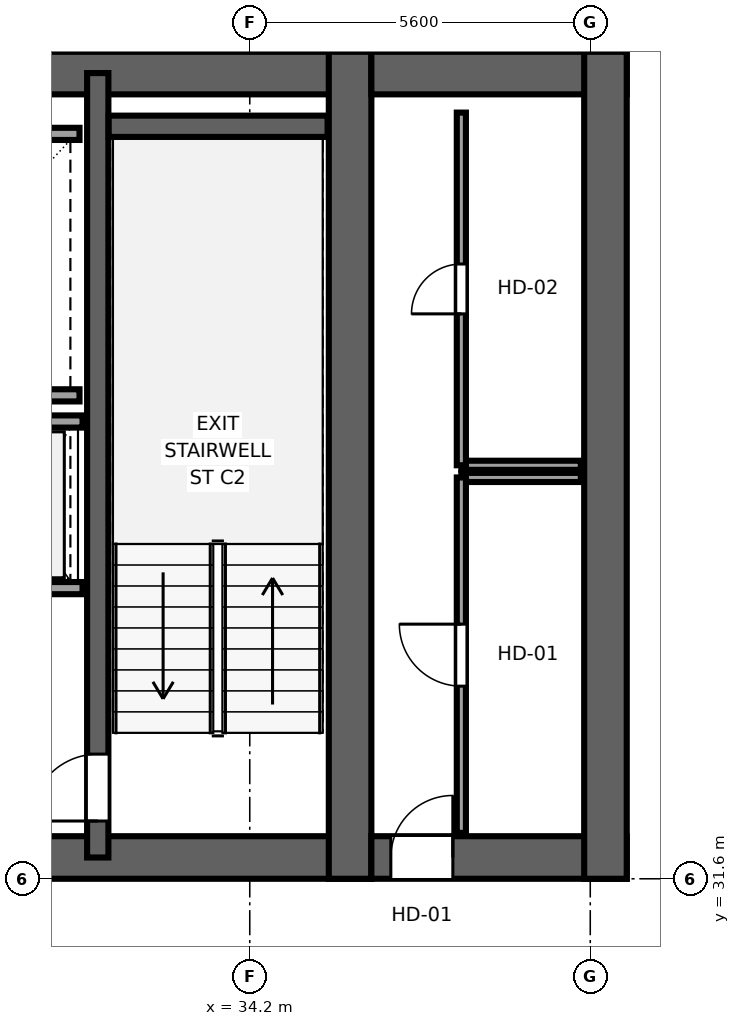
"""IFC4 building model, lengths in metres.
Left out: names, types, materials, properties, quantities, classifications, styles, units other than length and angle.
Written with IfcOpenShell. Run it as: python <this file> out.ifc"""

import sys

from ifc_helpers import new_model, si_unit, direction, frame, frame_2d, origin, place, context, subcontext, project, spatial, rectangle, extrude, source, transform, mapped, element, fill, save


model = new_model("IFC4")
c1 = context("Model", 3, precision=1e-05, world=origin(), true_north=direction((0.0, 1.0)))
c2 = subcontext(c1, "Body", "Model", "MODEL_VIEW")
j1 = project(units=[si_unit("LENGTHUNIT", "METRE"), si_unit("PLANEANGLEUNIT", "RADIAN")], contexts=[c1])
p1 = place(None, origin())
s1 = spatial("IfcSite", under=j1, at=p1, CompositionType="ELEMENT")
p2 = place(p1, origin())
s2 = spatial("IfcBuilding", under=s1, at=p2, CompositionType="ELEMENT")
p3 = place(p2, frame((0.0, 0.0, 150.6)))
s3 = spatial("IfcBuildingStorey", under=s2, at=p3, CompositionType="ELEMENT", Elevation=150.6)
p4 = place(p3, frame((9.8, 31.95, 0.0), z_axis=(0.0, 0.0, 1.0), x_axis=(1.0, 0.0, 0.0)))
e1 = element("IfcWall", 1, at=p4, inside=s3, PredefinedType="SHEAR", context=c2, shape_type="SweptSolid", body=[
    extrude(rectangle(XDim=26.4, YDim=0.7, at=frame_2d((13.2, 0.0))), origin(), (0.0, 0.0, 1.0), 3.55),
])
p5 = place(p4, frame((7.65, 0.0, 0.0), z_axis=(0.0, 0.0, 1.0), x_axis=(-1.0, 0.0, 0.0)))
e2 = element("IfcOpeningElement", 2, at=p5, cuts=e1, PredefinedType="OPENING", context=c2, shape_type="SweptSolid", body=[
    extrude(rectangle(XDim=1.5, YDim=2.04, at=frame_2d((0.75, 1.02))), frame((0.0, 0.36, 0.0), z_axis=(0.0, -1.0, 0.0), x_axis=(1.0, 0.0, 0.0)), (0.0, 0.0, 1.0), 0.72),
])
p6 = place(p4, frame((13.95, 0.0, 0.0), z_axis=(0.0, 0.0, 1.0), x_axis=(-1.0, 0.0, 0.0)))
e3 = element("IfcOpeningElement", 3, at=p6, cuts=e1, PredefinedType="OPENING", context=c2, shape_type="SweptSolid", body=[
    extrude(rectangle(XDim=1.5, YDim=2.04, at=frame_2d((0.75, 1.02))), frame((0.0, 0.36, 0.0), z_axis=(0.0, -1.0, 0.0), x_axis=(1.0, 0.0, 0.0)), (0.0, 0.0, 1.0), 0.72),
])
p7 = place(p4, frame((20.25, 0.0, 0.0), z_axis=(0.0, 0.0, 1.0), x_axis=(-1.0, 0.0, 0.0)))
e4 = element("IfcOpeningElement", 4, at=p7, cuts=e1, PredefinedType="OPENING", context=c2, shape_type="SweptSolid", body=[
    extrude(rectangle(XDim=1.5, YDim=2.04, at=frame_2d((0.75, 1.02))), frame((0.0, 0.36, 0.0), z_axis=(0.0, -1.0, 0.0), x_axis=(1.0, 0.0, 0.0)), (0.0, 0.0, 1.0), 0.72),
])
p8 = place(p3, frame((9.8, 44.85, 0.0), z_axis=(0.0, 0.0, 1.0), x_axis=(1.0, 0.0, 0.0)))
e5 = element("IfcWall", 5, at=p8, inside=s3, PredefinedType="SHEAR", context=c2, shape_type="SweptSolid", body=[
    extrude(rectangle(XDim=26.4, YDim=0.7, at=frame_2d((13.2, 0.0))), origin(), (0.0, 0.0, 1.0), 3.55),
])
p9 = place(p3, frame((35.85, 31.6, 0.0), z_axis=(0.0, 0.0, 1.0), x_axis=(0.0, 1.0, 0.0)))
e6 = element("IfcWall", 6, at=p9, inside=s3, PredefinedType="SHEAR", context=c2, shape_type="SweptSolid", body=[
    extrude(rectangle(XDim=13.6, YDim=0.7, at=frame_2d((6.8, 0.0))), origin(), (0.0, 0.0, 1.0), 3.55),
])
p10 = place(p3, frame((31.7, 31.95, 0.0), z_axis=(0.0, 0.0, 1.0), x_axis=(0.0, 1.0, 0.0)))
e7 = element("IfcWall", 7, at=p10, inside=s3, PredefinedType="SHEAR", context=c2, shape_type="SweptSolid", body=[
    extrude(rectangle(XDim=12.9, YDim=0.35, at=frame_2d((6.45, 0.0))), origin(), (0.0, 0.0, 1.0), 3.55),
])
p11 = place(p10, frame((1.7, 0.0, 0.0), z_axis=(0.0, 0.0, 1.0), x_axis=(-1.0, 0.0, 0.0)))
e8 = element("IfcOpeningElement", 8, at=p11, cuts=e7, PredefinedType="OPENING", context=c2, shape_type="SweptSolid", body=[
    extrude(rectangle(XDim=1.1, YDim=2.12, at=frame_2d((0.55, 1.06))), frame((0.0, 0.185, 0.0), z_axis=(0.0, -1.0, 0.0), x_axis=(1.0, 0.0, 0.0)), (0.0, 0.0, 1.0), 0.37),
])
p12 = place(p3, frame((36.2, 31.95, 0.0), z_axis=(0.0, 0.0, 1.0), x_axis=(1.0, 0.0, 0.0)))
e9 = element("IfcWall", 9, at=p12, inside=s3, PredefinedType="SHEAR", context=c2, shape_type="SweptSolid", body=[
    extrude(rectangle(XDim=4.2, YDim=0.7, at=frame_2d((2.1, 0.0))), origin(), (0.0, 0.0, 1.0), 3.55),
])
p13 = place(p12, frame((1.34, 0.0, 0.0), z_axis=(0.0, 0.0, 1.0), x_axis=(-1.0, 0.0, 0.0)))
e10 = element("IfcOpeningElement", 10, at=p13, cuts=e9, PredefinedType="OPENING", context=c2, shape_type="SweptSolid", body=[
    extrude(rectangle(XDim=1.02, YDim=2.03, at=frame_2d((0.51, 1.015))), frame((0.0, 0.36, 0.0), z_axis=(0.0, -1.0, 0.0), x_axis=(1.0, 0.0, 0.0)), (0.0, 0.0, 1.0), 0.72),
])
p14 = place(p3, frame((36.2, 44.85, 0.0), z_axis=(0.0, 0.0, 1.0), x_axis=(1.0, 0.0, 0.0)))
e11 = element("IfcWall", 11, at=p14, inside=s3, PredefinedType="SHEAR", context=c2, shape_type="SweptSolid", body=[
    extrude(rectangle(XDim=4.2, YDim=0.7, at=frame_2d((2.1, 0.0))), origin(), (0.0, 0.0, 1.0), 3.55),
])
p15 = place(p3, frame((40.05, 31.6, 0.0), z_axis=(0.0, 0.0, 1.0), x_axis=(0.0, 1.0, 0.0)))
e12 = element("IfcWall", 12, at=p15, inside=s3, PredefinedType="SHEAR", context=c2, shape_type="SweptSolid", body=[
    extrude(rectangle(XDim=13.6, YDim=0.7, at=frame_2d((6.8, 0.0))), origin(), (0.0, 0.0, 1.0), 3.55),
])
p16 = place(p3, frame((31.88, 43.975, 0.0), z_axis=(0.0, 0.0, 1.0), x_axis=(1.0, 0.0, 0.0)))
e13 = element("IfcWall", 13, at=p16, inside=s3, PredefinedType="SHEAR", context=c2, shape_type="SweptSolid", body=[
    extrude(rectangle(XDim=3.6, YDim=0.35, at=frame_2d((1.8, 0.0))), origin(), (0.0, 0.0, 1.0), 3.55),
])
for number, where, z_axis, x_axis in (
    (14, (27.3, 39.55, 0.0), (0.0, 0.0, 1.0), (1.0, 0.0, 0.0)),
    (15, (27.3, 43.85, 0.0), (0.0, 0.0, 1.0), (1.0, 0.0, 0.0)),
):
    element("IfcWall", number, at=place(p3, frame(where, z_axis=z_axis, x_axis=x_axis)), inside=s3, PredefinedType="SOLIDWALL", context=c2, shape_type="SweptSolid", body=[
        extrude(rectangle(XDim=4.1, YDim=0.2, at=frame_2d((2.05, 0.0))), origin(), (0.0, 0.0, 1.0), 3.37),
    ])
p17 = place(p3, frame((27.375, 36.38, 0.0), z_axis=(0.0, 0.0, 1.0), x_axis=(1.0, 0.0, 0.0)))
e16 = element("IfcWall", 16, at=p17, inside=s3, PredefinedType="SOLIDWALL", context=c2, shape_type="SweptSolid", body=[
    extrude(rectangle(XDim=4.075, YDim=0.2, at=frame_2d((2.038, 0.0))), origin(), (0.0, 0.0, 1.0), 3.37),
])
p18 = place(p17, frame((0.525, 0.0, 0.0)))
e17 = element("IfcOpeningElement", 17, at=p18, cuts=e16, PredefinedType="OPENING", context=c2, shape_type="SweptSolid", body=[
    extrude(rectangle(XDim=1.1, YDim=2.12, at=frame_2d((0.55, 1.06))), frame((0.0, 0.11, 0.0), z_axis=(0.0, -1.0, 0.0), x_axis=(1.0, 0.0, 0.0)), (0.0, 0.0, 1.0), 0.22),
])
p19 = place(p17, frame((2.425, 0.0, 0.0)))
e18 = element("IfcOpeningElement", 18, at=p19, cuts=e16, PredefinedType="OPENING", context=c2, shape_type="SweptSolid", body=[
    extrude(rectangle(XDim=1.1, YDim=2.12, at=frame_2d((0.55, 1.06))), frame((0.0, 0.11, 0.0), z_axis=(0.0, -1.0, 0.0), x_axis=(1.0, 0.0, 0.0)), (0.0, 0.0, 1.0), 0.22),
])
p20 = place(p3, frame((27.375, 39.12, 0.0), z_axis=(0.0, 0.0, 1.0), x_axis=(1.0, 0.0, 0.0)))
e19 = element("IfcWall", 19, at=p20, inside=s3, PredefinedType="SOLIDWALL", context=c2, shape_type="SweptSolid", body=[
    extrude(rectangle(XDim=4.075, YDim=0.2, at=frame_2d((2.038, 0.0))), origin(), (0.0, 0.0, 1.0), 3.37),
])
p21 = place(p3, frame((37.68, 38.2, 0.0), z_axis=(0.0, 0.0, 1.0), x_axis=(1.0, 0.0, 0.0)))
e20 = element("IfcWall", 20, at=p21, inside=s3, PredefinedType="PARTITIONING", context=c2, shape_type="SweptSolid", body=[
    extrude(rectangle(XDim=1.965, YDim=0.15, at=frame_2d((0.982, 0.0))), origin(), (0.0, 0.0, 1.0), 3.37),
])
p22 = place(p3, frame((37.68, 32.355, 0.0), z_axis=(0.0, 0.0, 1.0), x_axis=(0.0, 1.0, 0.0)))
e21 = element("IfcWall", 21, at=p22, inside=s3, PredefinedType="PARTITIONING", context=c2, shape_type="SweptSolid", body=[
    extrude(rectangle(XDim=5.845, YDim=0.15, at=frame_2d((2.922, 0.0))), origin(), (0.0, 0.0, 1.0), 3.37),
])
p23 = place(p22, frame((2.413, 0.0, 0.0)))
e22 = element("IfcOpeningElement", 22, at=p23, cuts=e21, PredefinedType="OPENING", context=c2, shape_type="SweptSolid", body=[
    extrude(rectangle(XDim=1.02, YDim=2.03, at=frame_2d((0.51, 1.015))), frame((0.0, 0.085, 0.0), z_axis=(0.0, -1.0, 0.0), x_axis=(1.0, 0.0, 0.0)), (0.0, 0.0, 1.0), 0.17),
])
p24 = place(p3, frame((37.68, 38.4, 0.0), z_axis=(0.0, 0.0, 1.0), x_axis=(1.0, 0.0, 0.0)))
e23 = element("IfcWall", 23, at=p24, inside=s3, PredefinedType="PARTITIONING", context=c2, shape_type="SweptSolid", body=[
    extrude(rectangle(XDim=1.965, YDim=0.15, at=frame_2d((0.982, 0.0))), origin(), (0.0, 0.0, 1.0), 3.37),
])
p25 = place(p3, frame((37.68, 38.4, 0.0), z_axis=(0.0, 0.0, 1.0), x_axis=(0.0, 1.0, 0.0)))
e24 = element("IfcWall", 24, at=p25, inside=s3, PredefinedType="PARTITIONING", context=c2, shape_type="SweptSolid", body=[
    extrude(rectangle(XDim=5.8, YDim=0.15, at=frame_2d((2.9, 0.0))), origin(), (0.0, 0.0, 1.0), 3.37),
])
p26 = place(p25, frame((2.49, 0.0, 0.0)))
e25 = element("IfcOpeningElement", 25, at=p26, cuts=e24, PredefinedType="OPENING", context=c2, shape_type="SweptSolid", body=[
    extrude(rectangle(XDim=0.82, YDim=2.01, at=frame_2d((0.41, 1.005))), frame((0.0, 0.085, 0.0), z_axis=(0.0, -1.0, 0.0), x_axis=(1.0, 0.0, 0.0)), (0.0, 0.0, 1.0), 0.17),
])
m1 = source(origin(), c2, "Body", "SweptSolid", [
    extrude(rectangle(XDim=1.1, YDim=2.12, at=frame_2d((0.55, 1.06))), frame((0.0, 0.025, 0.0), z_axis=(0.0, -1.0, 0.0), x_axis=(1.0, 0.0, 0.0)), (0.0, 0.0, 1.0), 0.05),
])
p27 = place(p11, origin())
e26 = element("IfcDoor", 26, at=p27, inside=s3, OperationType="SINGLE_SWING_LEFT", PredefinedType="DOOR", context=c2, shape_type="MappedRepresentation", body=[
    mapped(m1, transform((0.0, 0.0, 0.0), x_axis=(1.0, 0.0, 0.0), y_axis=(0.0, 1.0, 0.0), z_axis=(0.0, 0.0, 1.0), scale=1.0)),
])
fill(e8, e26)
m2 = source(origin(), c2, "Body", "SweptSolid", [
    extrude(rectangle(XDim=1.02, YDim=2.03, at=frame_2d((0.51, 1.015))), frame((0.0, 0.025, 0.0), z_axis=(0.0, -1.0, 0.0), x_axis=(1.0, 0.0, 0.0)), (0.0, 0.0, 1.0), 0.05),
])
p28 = place(p13, origin())
e27 = element("IfcDoor", 27, at=p28, inside=s3, OperationType="SINGLE_SWING_RIGHT", PredefinedType="DOOR", context=c2, shape_type="MappedRepresentation", body=[
    mapped(m2, transform((0.0, 0.0, 0.0), x_axis=(1.0, 0.0, 0.0), y_axis=(0.0, 1.0, 0.0), z_axis=(0.0, 0.0, 1.0), scale=1.0)),
])
fill(e10, e27)
p29 = place(p23, origin())
e28 = element("IfcDoor", 28, at=p29, inside=s3, OperationType="SINGLE_SWING_RIGHT", PredefinedType="DOOR", context=c2, shape_type="MappedRepresentation", body=[
    mapped(m2, transform((0.0, 0.0, 0.0), x_axis=(1.0, 0.0, 0.0), y_axis=(0.0, 1.0, 0.0), z_axis=(0.0, 0.0, 1.0), scale=1.0)),
])
fill(e22, e28)
m3 = source(origin(), c2, "Body", "SweptSolid", [
    extrude(rectangle(XDim=0.82, YDim=2.01, at=frame_2d((0.41, 1.005))), frame((0.0, 0.025, 0.0), z_axis=(0.0, -1.0, 0.0), x_axis=(1.0, 0.0, 0.0)), (0.0, 0.0, 1.0), 0.05),
])
p30 = place(p26, origin())
e29 = element("IfcDoor", 29, at=p30, inside=s3, OperationType="SINGLE_SWING_LEFT", PredefinedType="DOOR", context=c2, shape_type="MappedRepresentation", body=[
    mapped(m3, transform((0.0, 0.0, 0.0), x_axis=(1.0, 0.0, 0.0), y_axis=(0.0, 1.0, 0.0), z_axis=(0.0, 0.0, 1.0), scale=1.0)),
])
fill(e25, e29)
save(model, sys.argv[1])
